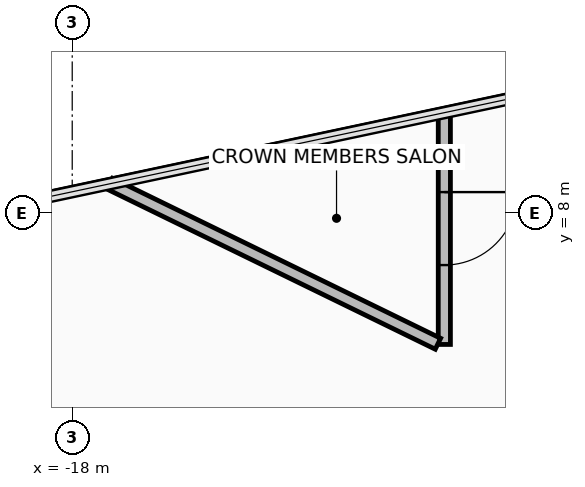
"""IFC4 building model, lengths in metres.
Left out: names, types, materials, properties, quantities, classifications, styles, units other than length and angle.
Written with IfcOpenShell. Run it as: python <this file> out.ifc"""

import sys

from ifc_helpers import new_model, si_unit, direction, frame, frame_2d, origin, place, context, subcontext, project, spatial, rectangle, extrude, element, fill, save


model = new_model("IFC4")
c1 = context("Model", 3, precision=1e-05, world=origin(), true_north=direction((0.0, 1.0)))
c2 = subcontext(c1, "Body", "Model", "MODEL_VIEW")
j1 = project(units=[si_unit("LENGTHUNIT", "METRE"), si_unit("PLANEANGLEUNIT", "RADIAN")], contexts=[c1])
p1 = place(None, origin())
s1 = spatial("IfcSite", under=j1, at=p1, CompositionType="ELEMENT")
p2 = place(p1, origin())
s2 = spatial("IfcBuilding", under=s1, at=p2, CompositionType="ELEMENT")
p3 = place(p2, frame((0.0, 0.0, 290.7)))
s3 = spatial("IfcBuildingStorey", under=s2, at=p3, CompositionType="ELEMENT", Elevation=290.7)
p4 = place(p3, frame((-11.88, 9.646, 0.0), z_axis=(0.0, 0.0, 1.0), x_axis=(0.0, -1.0, 0.0)))
e1 = element("IfcWall", 1, at=p4, inside=s3, PredefinedType="PARTITIONING", context=c2, shape_type="SweptSolid", body=[
    extrude(rectangle(XDim=3.812, YDim=0.2, at=frame_2d((1.906, 0.0))), origin(), (0.0, 0.0, 1.0), 2.81),
])
p5 = place(p4, frame((1.306, 0.0, 0.0)))
e2 = element("IfcOpeningElement", 2, at=p5, cuts=e1, PredefinedType="OPENING", context=c2, shape_type="SweptSolid", body=[
    extrude(rectangle(XDim=1.2, YDim=2.15, at=frame_2d((0.6, 1.075))), frame((0.0, 0.11, 0.0), z_axis=(0.0, -1.0, 0.0), x_axis=(1.0, 0.0, 0.0)), (0.0, 0.0, 1.0), 0.22),
])
p6 = place(p3, frame((-11.985, 5.845, 0.0), z_axis=(0.0, 0.0, 1.0), x_axis=(-0.898777045876, 0.438406001107, 0.0)))
e3 = element("IfcWall", 3, at=p6, inside=s3, PredefinedType="PARTITIONING", context=c2, shape_type="SweptSolid", body=[
    extrude(rectangle(XDim=6.002, YDim=0.2, at=frame_2d((3.001, 0.0))), origin(), (0.0, 0.0, 1.0), 2.81),
])
p7 = place(p5, origin())
e4 = element("IfcDoor", 4, at=p7, inside=s3, OperationType="SINGLE_SWING_LEFT", PredefinedType="DOOR", context=c2, shape_type="SweptSolid", body=[
    extrude(rectangle(XDim=1.2, YDim=2.15, at=frame_2d((0.6, 1.075))), frame((0.0, 0.025, 0.0), z_axis=(0.0, -1.0, 0.0), x_axis=(1.0, 0.0, 0.0)), (0.0, 0.0, 1.0), 0.05),
])
fill(e2, e4)
save(model, sys.argv[1])
